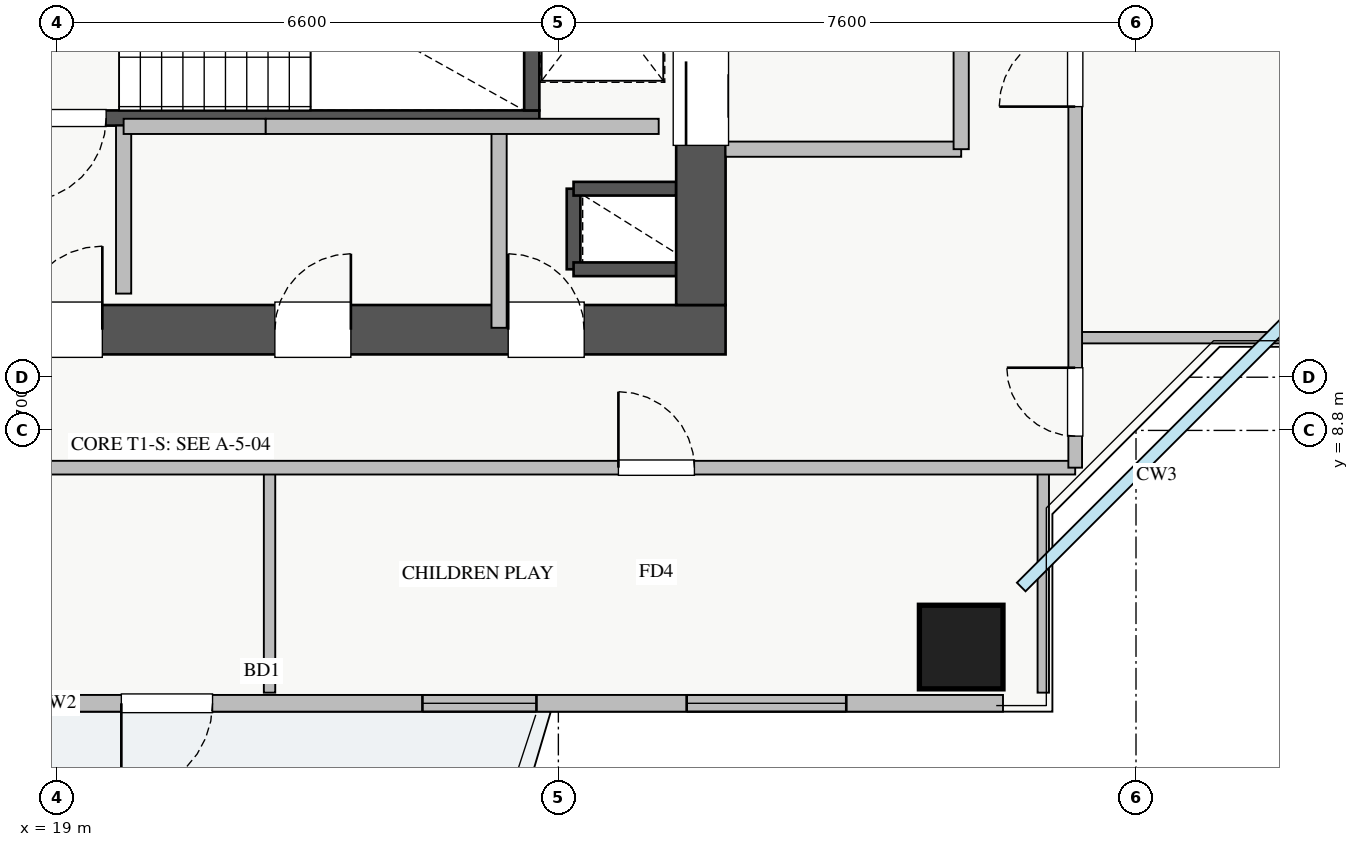
"""IFC4 building model, lengths in metres.
Left out: names, types, materials, properties, quantities, classifications, styles, units other than length and angle.
Written with IfcOpenShell. Run it as: python <this file> out.ifc"""

import sys

from ifc_helpers import new_model, si_unit, direction, frame, frame_2d, origin, origin_2d, place, context, subcontext, project, spatial, rectangle, extrude, source, transform, mapped, element, fill, save


model = new_model("IFC4")
c1 = context("Model", 3, precision=1e-05, world=origin(), true_north=direction((0.0, 1.0)))
c2 = subcontext(c1, "Body", "Model", "MODEL_VIEW")
j1 = project(units=[si_unit("LENGTHUNIT", "METRE"), si_unit("PLANEANGLEUNIT", "RADIAN")], contexts=[c1])
p1 = place(None, origin())
s1 = spatial("IfcSite", under=j1, at=p1, CompositionType="ELEMENT")
p2 = place(p1, origin())
s2 = spatial("IfcBuilding", under=s1, at=p2, CompositionType="ELEMENT")
p3 = place(p2, frame((0.0, 0.0, 136.0)))
s3 = spatial("IfcBuildingStorey", under=s2, at=p3, CompositionType="ELEMENT", Elevation=136.0)
p4 = place(p3, frame((25.8, 10.92, 0.0), z_axis=(0.0, 0.0, 1.0), x_axis=(0.0, 1.0, 0.0)))
e1 = element("IfcWall", 1, at=p4, inside=s3, PredefinedType="SHEAR", context=c2, shape_type="SweptSolid", body=[
    extrude(rectangle(XDim=1.06, YDim=0.18, at=frame_2d((0.53, 0.0))), origin(), (0.0, 0.0, 1.0), 3.03),
])
for number, where, z_axis, x_axis in (
    (2, (25.8, 11.98, 0.0), (0.0, 0.0, 1.0), (1.0, 0.0, 0.0)),
    (3, (25.8, 10.92, 0.0), (0.0, 0.0, 1.0), (1.0, 0.0, 0.0)),
):
    element("IfcWall", number, at=place(p3, frame(where, z_axis=z_axis, x_axis=x_axis)), inside=s3, PredefinedType="SHEAR", context=c2, shape_type="SweptSolid", body=[
        extrude(rectangle(XDim=1.35, YDim=0.18, at=frame_2d((0.675, 0.0))), origin(), (0.0, 0.0, 1.0), 3.03),
    ])
p5 = place(p3, frame((18.2, 12.91, 0.0), z_axis=(0.0, 0.0, 1.0), x_axis=(1.0, 0.0, 0.0)))
e4 = element("IfcWall", 4, at=p5, inside=s3, PredefinedType="SHEAR", context=c2, shape_type="SweptSolid", body=[
    extrude(rectangle(XDim=7.15, YDim=0.2, at=frame_2d((3.575, 0.0))), origin(), (0.0, 0.0, 1.0), 3.25),
])
p6 = place(p5, frame((0.35, 0.0, 0.0)))
e5 = element("IfcOpeningElement", 5, at=p6, cuts=e4, PredefinedType="OPENING", context=c2, shape_type="SweptSolid", body=[
    extrude(rectangle(XDim=1.1, YDim=2.05, at=frame_2d((0.55, 1.025))), frame((0.0, 0.11, 0.0), z_axis=(0.0, -1.0, 0.0), x_axis=(1.0, 0.0, 0.0)), (0.0, 0.0, 1.0), 0.22),
])
p7 = place(p3, frame((25.25, 13.01, 0.0), z_axis=(0.0, 0.0, 1.0), x_axis=(0.0, 1.0, 0.0)))
e6 = element("IfcWall", 6, at=p7, inside=s3, PredefinedType="SHEAR", context=c2, shape_type="SweptSolid", body=[
    extrude(rectangle(XDim=2.94, YDim=0.2, at=frame_2d((1.47, 0.0))), origin(), (0.0, 0.0, 1.0), 3.25),
])
p8 = place(p3, frame((10.2, 10.125, 0.0), z_axis=(0.0, 0.0, 1.0), x_axis=(1.0, 0.0, 0.0)))
e7 = element("IfcWall", 7, at=p8, inside=s3, PredefinedType="SHEAR", context=c2, shape_type="SweptSolid", body=[
    extrude(rectangle(XDim=17.6, YDim=0.65, at=frame_2d((8.8, 0.0))), origin(), (0.0, 0.0, 1.0), 3.25),
])
p9 = place(p8, frame((1.15, 0.0, 0.0)))
e8 = element("IfcOpeningElement", 8, at=p9, cuts=e7, PredefinedType="OPENING", context=c2, shape_type="SweptSolid", body=[
    extrude(rectangle(XDim=1.1, YDim=2.05, at=frame_2d((0.55, 1.025))), frame((0.0, 0.335, 0.0), z_axis=(0.0, -1.0, 0.0), x_axis=(1.0, 0.0, 0.0)), (0.0, 0.0, 1.0), 0.67),
])
p10 = place(p8, frame((8.3, 0.0, 0.0)))
e9 = element("IfcOpeningElement", 9, at=p10, cuts=e7, PredefinedType="OPENING", context=c2, shape_type="SweptSolid", body=[
    extrude(rectangle(XDim=1.1, YDim=2.05, at=frame_2d((0.55, 1.025))), frame((0.0, 0.335, 0.0), z_axis=(0.0, -1.0, 0.0), x_axis=(1.0, 0.0, 0.0)), (0.0, 0.0, 1.0), 0.67),
])
p11 = place(p8, frame((4.9, 0.0, 0.0)))
e10 = element("IfcOpeningElement", 10, at=p11, cuts=e7, PredefinedType="OPENING", context=c2, shape_type="SweptSolid", body=[
    extrude(rectangle(XDim=1.1, YDim=2.05, at=frame_2d((0.55, 1.025))), frame((0.0, 0.335, 0.0), z_axis=(0.0, -1.0, 0.0), x_axis=(1.0, 0.0, 0.0)), (0.0, 0.0, 1.0), 0.67),
])
p12 = place(p8, frame((14.74, 0.0, 0.0)))
e11 = element("IfcOpeningElement", 11, at=p12, cuts=e7, PredefinedType="OPENING", context=c2, shape_type="SweptSolid", body=[
    extrude(rectangle(XDim=1.0, YDim=2.05, at=frame_2d((0.5, 1.025))), frame((0.0, 0.335, 0.0), z_axis=(0.0, -1.0, 0.0), x_axis=(1.0, 0.0, 0.0)), (0.0, 0.0, 1.0), 0.67),
])
p13 = place(p8, frame((11.67, 0.0, 0.0)))
e12 = element("IfcOpeningElement", 12, at=p13, cuts=e7, PredefinedType="OPENING", context=c2, shape_type="SweptSolid", body=[
    extrude(rectangle(XDim=1.0, YDim=2.05, at=frame_2d((0.5, 1.025))), frame((0.0, 0.335, 0.0), z_axis=(0.0, -1.0, 0.0), x_axis=(1.0, 0.0, 0.0)), (0.0, 0.0, 1.0), 0.67),
])
p14 = place(p3, frame((27.475, 10.45, 0.0), z_axis=(0.0, 0.0, 1.0), x_axis=(0.0, 1.0, 0.0)))
e13 = element("IfcWall", 13, at=p14, inside=s3, PredefinedType="SHEAR", context=c2, shape_type="SweptSolid", body=[
    extrude(rectangle(XDim=5.9, YDim=0.65, at=frame_2d((2.95, 0.0))), origin(), (0.0, 0.0, 1.0), 3.25),
])
p15 = place(p14, frame((2.1, 0.0, 0.0)))
e14 = element("IfcOpeningElement", 14, at=p15, cuts=e13, PredefinedType="OPENING", context=c2, shape_type="SweptSolid", body=[
    extrude(rectangle(XDim=1.3, YDim=2.05, at=frame_2d((0.65, 1.025))), frame((0.0, 0.335, 0.0), z_axis=(0.0, -1.0, 0.0), x_axis=(1.0, 0.0, 0.0)), (0.0, 0.0, 1.0), 0.67),
])
m1 = source(origin(), c2, "Body", "SweptSolid", [
    extrude(rectangle(XDim=1.1, YDim=1.1, at=origin_2d()), origin(), (0.0, 0.0, 1.0), 3.25),
])
p16 = place(p3, frame((30.9, 5.95, 0.0), z_axis=(0.0, 0.0, 1.0), x_axis=(1.0, 0.0, 0.0)))
e15 = element("IfcColumn", 15, at=p16, inside=s3, PredefinedType="COLUMN", context=c2, shape_type="MappedRepresentation", body=[
    mapped(m1, transform((0.0, 0.0, 0.0), x_axis=(1.0, 0.0, 0.0), y_axis=(0.0, 1.0, 0.0), z_axis=(0.0, 0.0, 1.0), scale=1.0)),
])
p17 = place(p3, frame((6.55, 5.21, 0.0), z_axis=(0.0, 0.0, 1.0), x_axis=(1.0, 0.0, 0.0)))
e16 = element("IfcWall", 16, at=p17, inside=s3, PredefinedType="STANDARD", context=c2, shape_type="SweptSolid", body=[
    extrude(rectangle(XDim=24.9, YDim=0.22, at=frame_2d((12.45, 0.0))), origin(), (0.0, 0.0, 1.0), 2.57),
])
p18 = place(p17, frame((13.3, 0.0, 0.0)))
e17 = element("IfcOpeningElement", 17, at=p18, cuts=e16, PredefinedType="OPENING", context=c2, shape_type="SweptSolid", body=[
    extrude(rectangle(XDim=1.2, YDim=2.1, at=frame_2d((0.6, 1.05))), frame((0.0, 0.12, 0.0), z_axis=(0.0, -1.0, 0.0), x_axis=(1.0, 0.0, 0.0)), (0.0, 0.0, 1.0), 0.24),
])
p19 = place(p17, frame((0.393, 0.0, 0.9)))
e18 = element("IfcOpeningElement", 18, at=p19, cuts=e16, PredefinedType="OPENING", context=c2, shape_type="SweptSolid", body=[
    extrude(rectangle(XDim=1.5, YDim=1.5, at=frame_2d((0.75, 0.75))), frame((0.0, 0.12, 0.0), z_axis=(0.0, -1.0, 0.0), x_axis=(1.0, 0.0, 0.0)), (0.0, 0.0, 1.0), 0.24),
])
p20 = place(p17, frame((8.438, 0.0, 0.9)))
e19 = element("IfcOpeningElement", 19, at=p20, cuts=e16, PredefinedType="OPENING", context=c2, shape_type="SweptSolid", body=[
    extrude(rectangle(XDim=1.8, YDim=1.45, at=frame_2d((0.9, 0.725))), frame((0.0, 0.12, 0.0), z_axis=(0.0, -1.0, 0.0), x_axis=(1.0, 0.0, 0.0)), (0.0, 0.0, 1.0), 0.24),
])
p21 = place(p17, frame((17.261, 0.0, 0.9)))
e20 = element("IfcOpeningElement", 20, at=p21, cuts=e16, PredefinedType="OPENING", context=c2, shape_type="SweptSolid", body=[
    extrude(rectangle(XDim=1.5, YDim=1.5, at=frame_2d((0.75, 0.75))), frame((0.0, 0.12, 0.0), z_axis=(0.0, -1.0, 0.0), x_axis=(1.0, 0.0, 0.0)), (0.0, 0.0, 1.0), 0.24),
])
p22 = place(p17, frame((20.738, 0.0, 0.9)))
e21 = element("IfcOpeningElement", 21, at=p22, cuts=e16, PredefinedType="OPENING", context=c2, shape_type="SweptSolid", body=[
    extrude(rectangle(XDim=2.1, YDim=1.48, at=frame_2d((1.05, 0.74))), frame((0.0, 0.12, 0.0), z_axis=(0.0, -1.0, 0.0), x_axis=(1.0, 0.0, 0.0)), (0.0, 0.0, 1.0), 0.24),
])
p23 = place(p17, frame((4.171, 0.0, 0.9)))
e22 = element("IfcOpeningElement", 22, at=p23, cuts=e16, PredefinedType="OPENING", context=c2, shape_type="SweptSolid", body=[
    extrude(rectangle(XDim=2.4, YDim=1.5, at=frame_2d((1.2, 0.75))), frame((0.0, 0.12, 0.0), z_axis=(0.0, -1.0, 0.0), x_axis=(1.0, 0.0, 0.0)), (0.0, 0.0, 1.0), 0.24),
])
p24 = place(p3, frame((27.8, 12.5, 0.0), z_axis=(0.0, 0.0, 1.0), x_axis=(1.0, 0.0, 0.0)))
e23 = element("IfcWall", 23, at=p24, inside=s3, PredefinedType="PARTITIONING", context=c2, shape_type="SweptSolid", body=[
    extrude(rectangle(XDim=3.1, YDim=0.2, at=frame_2d((1.55, 0.0))), origin(), (0.0, 0.0, 1.0), 3.03),
])
p25 = place(p3, frame((30.9, 12.5, 0.0), z_axis=(0.0, 0.0, 1.0), x_axis=(0.0, 1.0, 0.0)))
e24 = element("IfcWall", 24, at=p25, inside=s3, PredefinedType="PARTITIONING", context=c2, shape_type="SweptSolid", body=[
    extrude(rectangle(XDim=3.9, YDim=0.2, at=frame_2d((1.95, 0.0))), origin(), (0.0, 0.0, 1.0), 3.03),
])
p26 = place(p25, frame((1.4, 0.0, 0.0)))
e25 = element("IfcOpeningElement", 25, at=p26, cuts=e24, PredefinedType="OPENING", context=c2, shape_type="SweptSolid", body=[
    extrude(rectangle(XDim=1.1, YDim=2.05, at=frame_2d((0.55, 1.025))), frame((0.0, 0.11, 0.0), z_axis=(0.0, -1.0, 0.0), x_axis=(1.0, 0.0, 0.0)), (0.0, 0.0, 1.0), 0.22),
])
p27 = place(p3, frame((19.88, 10.6, 0.0), z_axis=(0.0, 0.0, 1.0), x_axis=(0.0, 1.0, 0.0)))
e26 = element("IfcWall", 26, at=p27, inside=s3, PredefinedType="PARTITIONING", context=c2, shape_type="SweptSolid", body=[
    extrude(rectangle(XDim=2.21, YDim=0.2, at=frame_2d((1.105, 0.0))), origin(), (0.0, 0.0, 1.0), 3.03),
])
p28 = place(p3, frame((24.82, 10.15, 0.0), z_axis=(0.0, 0.0, 1.0), x_axis=(0.0, 1.0, 0.0)))
e27 = element("IfcWall", 27, at=p28, inside=s3, PredefinedType="PARTITIONING", context=c2, shape_type="SweptSolid", body=[
    extrude(rectangle(XDim=2.65, YDim=0.2, at=frame_2d((1.325, 0.0))), origin(), (0.0, 0.0, 1.0), 3.03),
])
p29 = place(p3, frame((19.88, 12.8, 0.0), z_axis=(0.0, 0.0, 1.0), x_axis=(1.0, 0.0, 0.0)))
e28 = element("IfcWall", 28, at=p29, inside=s3, PredefinedType="PARTITIONING", context=c2, shape_type="SweptSolid", body=[
    extrude(rectangle(XDim=1.87, YDim=0.2, at=frame_2d((0.935, 0.0))), origin(), (0.0, 0.0, 1.0), 3.03),
])
p30 = place(p3, frame((21.75, 12.8, 0.0), z_axis=(0.0, 0.0, 1.0), x_axis=(1.0, 0.0, 0.0)))
e29 = element("IfcWall", 29, at=p30, inside=s3, PredefinedType="PARTITIONING", context=c2, shape_type="SweptSolid", body=[
    extrude(rectangle(XDim=5.17, YDim=0.2, at=frame_2d((2.585, 0.0))), origin(), (0.0, 0.0, 1.0), 3.03),
])
for number, where, z_axis, x_axis in (
    (30, (21.8, 5.35, 0.0), (0.0, 0.0, 1.0), (0.0, 1.0, 0.0)),
    (31, (31.98, 5.35, 0.0), (0.0, 0.0, 1.0), (0.0, 1.0, 0.0)),
):
    element("IfcWall", number, at=place(p3, frame(where, z_axis=z_axis, x_axis=x_axis)), inside=s3, PredefinedType="PARTITIONING", context=c2, shape_type="SweptSolid", body=[
        extrude(rectangle(XDim=2.96, YDim=0.15, at=frame_2d((1.48, 0.0))), origin(), (0.0, 0.0, 1.0), 3.03),
    ])
p31 = place(p3, frame((8.82, 8.31, 0.0), z_axis=(0.0, 0.0, 1.0), x_axis=(1.0, 0.0, 0.0)))
e32 = element("IfcWall", 32, at=p31, inside=s3, PredefinedType="PARTITIONING", context=c2, shape_type="SweptSolid", body=[
    extrude(rectangle(XDim=23.58, YDim=0.18, at=frame_2d((11.79, 0.0))), origin(), (0.0, 0.0, 1.0), 3.03),
])
p32 = place(p31, frame((5.99, 0.0, 0.0)))
e33 = element("IfcOpeningElement", 33, at=p32, cuts=e32, PredefinedType="OPENING", context=c2, shape_type="SweptSolid", body=[
    extrude(rectangle(XDim=1.0, YDim=2.05, at=frame_2d((0.5, 1.025))), frame((0.0, 0.1, 0.0), z_axis=(0.0, -1.0, 0.0), x_axis=(1.0, 0.0, 0.0)), (0.0, 0.0, 1.0), 0.2),
])
p33 = place(p31, frame((17.57, 0.0, 0.0)))
e34 = element("IfcOpeningElement", 34, at=p33, cuts=e32, PredefinedType="OPENING", context=c2, shape_type="SweptSolid", body=[
    extrude(rectangle(XDim=1.0, YDim=2.05, at=frame_2d((0.5, 1.025))), frame((0.0, 0.1, 0.0), z_axis=(0.0, -1.0, 0.0), x_axis=(1.0, 0.0, 0.0)), (0.0, 0.0, 1.0), 0.2),
])
p34 = place(p3, frame((32.4, 10.02, 0.0), z_axis=(0.0, 0.0, 1.0), x_axis=(1.0, 0.0, 0.0)))
e35 = element("IfcWall", 35, at=p34, inside=s3, PredefinedType="PARTITIONING", context=c2, shape_type="SweptSolid", body=[
    extrude(rectangle(XDim=4.25, YDim=0.15, at=frame_2d((2.125, 0.0))), origin(), (0.0, 0.0, 1.0), 3.03),
])
p35 = place(p3, frame((32.4, 8.31, 0.0), z_axis=(0.0, 0.0, 1.0), x_axis=(0.0, 1.0, 0.0)))
e36 = element("IfcWall", 36, at=p35, inside=s3, PredefinedType="PARTITIONING", context=c2, shape_type="SweptSolid", body=[
    extrude(rectangle(XDim=29.13, YDim=0.18, at=frame_2d((14.565, 0.0))), origin(), (0.0, 0.0, 1.0), 3.03),
])
p36 = place(p35, frame((27.94, 0.0, 0.0)))
e37 = element("IfcOpeningElement", 37, at=p36, cuts=e36, PredefinedType="OPENING", context=c2, shape_type="SweptSolid", body=[
    extrude(rectangle(XDim=0.9, YDim=2.05, at=frame_2d((0.45, 1.025))), frame((0.0, 0.1, 0.0), z_axis=(0.0, -1.0, 0.0), x_axis=(1.0, 0.0, 0.0)), (0.0, 0.0, 1.0), 0.2),
])
p37 = place(p35, frame((0.415, 0.0, 0.0)))
e38 = element("IfcOpeningElement", 38, at=p37, cuts=e36, PredefinedType="OPENING", context=c2, shape_type="SweptSolid", body=[
    extrude(rectangle(XDim=0.9, YDim=2.05, at=frame_2d((0.45, 1.025))), frame((0.0, 0.1, 0.0), z_axis=(0.0, -1.0, 0.0), x_axis=(1.0, 0.0, 0.0)), (0.0, 0.0, 1.0), 0.2),
])
p38 = place(p35, frame((4.75, 0.0, 0.0)))
e39 = element("IfcOpeningElement", 39, at=p38, cuts=e36, PredefinedType="OPENING", context=c2, shape_type="SweptSolid", body=[
    extrude(rectangle(XDim=1.0, YDim=2.05, at=frame_2d((0.5, 1.025))), frame((0.0, 0.1, 0.0), z_axis=(0.0, -1.0, 0.0), x_axis=(1.0, 0.0, 0.0)), (0.0, 0.0, 1.0), 0.2),
])
p39 = place(p35, frame((18.11, 0.0, 0.0)))
e40 = element("IfcOpeningElement", 40, at=p39, cuts=e36, PredefinedType="OPENING", context=c2, shape_type="SweptSolid", body=[
    extrude(rectangle(XDim=1.0, YDim=2.05, at=frame_2d((0.5, 1.025))), frame((0.0, 0.1, 0.0), z_axis=(0.0, -1.0, 0.0), x_axis=(1.0, 0.0, 0.0)), (0.0, 0.0, 1.0), 0.2),
])
m2 = source(origin(), c2, "Body", "SweptSolid", [
    extrude(rectangle(XDim=1.2, YDim=2.1, at=frame_2d((0.6, 1.05))), frame((0.0, 0.025, 0.0), z_axis=(0.0, -1.0, 0.0), x_axis=(1.0, 0.0, 0.0)), (0.0, 0.0, 1.0), 0.05),
])
p40 = place(p18, frame((1.2, 0.0, 0.0), z_axis=(0.0, 0.0, 1.0), x_axis=(-1.0, 0.0, 0.0)))
e41 = element("IfcDoor", 41, at=p40, inside=s3, OperationType="SINGLE_SWING_LEFT", PredefinedType="DOOR", context=c2, shape_type="MappedRepresentation", body=[
    mapped(m2, transform((0.0, 0.0, 0.0), x_axis=(1.0, 0.0, 0.0), y_axis=(0.0, 1.0, 0.0), z_axis=(0.0, 0.0, 1.0), scale=1.0)),
])
fill(e17, e41)
m3 = source(origin(), c2, "Body", "SweptSolid", [
    extrude(rectangle(XDim=1.5, YDim=1.5, at=frame_2d((0.75, 0.75))), frame((0.0, 0.03, 0.0), z_axis=(0.0, -1.0, 0.0), x_axis=(1.0, 0.0, 0.0)), (0.0, 0.0, 1.0), 0.06),
])
p41 = place(p21, origin())
e42 = element("IfcWindow", 42, at=p41, inside=s3, PartitioningType="DOUBLE_PANEL_VERTICAL", PredefinedType="WINDOW", context=c2, shape_type="MappedRepresentation", body=[
    mapped(m3, transform((0.0, 0.0, 0.0), x_axis=(1.0, 0.0, 0.0), y_axis=(0.0, 1.0, 0.0), z_axis=(0.0, 0.0, 1.0), scale=1.0)),
])
fill(e20, e42)
m4 = source(origin(), c2, "Body", "SweptSolid", [
    extrude(rectangle(XDim=2.1, YDim=1.48, at=frame_2d((1.05, 0.74))), frame((0.0, 0.03, 0.0), z_axis=(0.0, -1.0, 0.0), x_axis=(1.0, 0.0, 0.0)), (0.0, 0.0, 1.0), 0.06),
])
p42 = place(p22, origin())
e43 = element("IfcWindow", 43, at=p42, inside=s3, PartitioningType="TRIPLE_PANEL_VERTICAL", PredefinedType="WINDOW", context=c2, shape_type="MappedRepresentation", body=[
    mapped(m4, transform((0.0, 0.0, 0.0), x_axis=(1.0, 0.0, 0.0), y_axis=(0.0, 1.0, 0.0), z_axis=(0.0, 0.0, 1.0), scale=1.0)),
])
fill(e21, e43)
m5 = source(origin(), c2, "Body", "SweptSolid", [
    extrude(rectangle(XDim=1.3, YDim=2.05, at=frame_2d((0.65, 1.025))), frame((0.0, 0.025, 0.0), z_axis=(0.0, -1.0, 0.0), x_axis=(1.0, 0.0, 0.0)), (0.0, 0.0, 1.0), 0.05),
])
p43 = place(p15, origin())
e44 = element("IfcDoor", 44, at=p43, inside=s3, OperationType="SLIDING_TO_RIGHT", PredefinedType="DOOR", context=c2, shape_type="MappedRepresentation", body=[
    mapped(m5, transform((0.0, 0.0, 0.0), x_axis=(1.0, 0.0, 0.0), y_axis=(0.0, 1.0, 0.0), z_axis=(0.0, 0.0, 1.0), scale=1.0)),
])
fill(e14, e44)
m6 = source(origin(), c2, "Body", "SweptSolid", [
    extrude(rectangle(XDim=1.1, YDim=2.05, at=frame_2d((0.55, 1.025))), frame((0.0, 0.025, 0.0), z_axis=(0.0, -1.0, 0.0), x_axis=(1.0, 0.0, 0.0)), (0.0, 0.0, 1.0), 0.05),
])
p44 = place(p10, origin())
e45 = element("IfcDoor", 45, at=p44, inside=s3, OperationType="SINGLE_SWING_RIGHT", PredefinedType="DOOR", context=c2, shape_type="MappedRepresentation", body=[
    mapped(m6, transform((0.0, 0.0, 0.0), x_axis=(1.0, 0.0, 0.0), y_axis=(0.0, 1.0, 0.0), z_axis=(0.0, 0.0, 1.0), scale=1.0)),
])
fill(e9, e45)
p45 = place(p6, frame((1.1, 0.0, 0.0), z_axis=(0.0, 0.0, 1.0), x_axis=(-1.0, 0.0, 0.0)))
e46 = element("IfcDoor", 46, at=p45, inside=s3, OperationType="SINGLE_SWING_LEFT", PredefinedType="DOOR", context=c2, shape_type="MappedRepresentation", body=[
    mapped(m6, transform((0.0, 0.0, 0.0), x_axis=(1.0, 0.0, 0.0), y_axis=(0.0, 1.0, 0.0), z_axis=(0.0, 0.0, 1.0), scale=1.0)),
])
fill(e5, e46)
m7 = source(origin(), c2, "Body", "SweptSolid", [
    extrude(rectangle(XDim=1.0, YDim=2.05, at=frame_2d((0.5, 1.025))), frame((0.0, 0.025, 0.0), z_axis=(0.0, -1.0, 0.0), x_axis=(1.0, 0.0, 0.0)), (0.0, 0.0, 1.0), 0.05),
])
p46 = place(p12, origin())
e47 = element("IfcDoor", 47, at=p46, inside=s3, OperationType="SINGLE_SWING_LEFT", PredefinedType="DOOR", context=c2, shape_type="MappedRepresentation", body=[
    mapped(m7, transform((0.0, 0.0, 0.0), x_axis=(1.0, 0.0, 0.0), y_axis=(0.0, 1.0, 0.0), z_axis=(0.0, 0.0, 1.0), scale=1.0)),
])
fill(e11, e47)
p47 = place(p13, origin())
e48 = element("IfcDoor", 48, at=p47, inside=s3, OperationType="SINGLE_SWING_RIGHT", PredefinedType="DOOR", context=c2, shape_type="MappedRepresentation", body=[
    mapped(m7, transform((0.0, 0.0, 0.0), x_axis=(1.0, 0.0, 0.0), y_axis=(0.0, 1.0, 0.0), z_axis=(0.0, 0.0, 1.0), scale=1.0)),
])
fill(e12, e48)
p48 = place(p33, origin())
e49 = element("IfcDoor", 49, at=p48, inside=s3, OperationType="SINGLE_SWING_LEFT", PredefinedType="DOOR", context=c2, shape_type="MappedRepresentation", body=[
    mapped(m7, transform((0.0, 0.0, 0.0), x_axis=(1.0, 0.0, 0.0), y_axis=(0.0, 1.0, 0.0), z_axis=(0.0, 0.0, 1.0), scale=1.0)),
])
fill(e34, e49)
m8 = source(origin(), c2, "Body", "SweptSolid", [
    extrude(rectangle(XDim=0.9, YDim=2.05, at=frame_2d((0.45, 1.025))), frame((0.0, 0.025, 0.0), z_axis=(0.0, -1.0, 0.0), x_axis=(1.0, 0.0, 0.0)), (0.0, 0.0, 1.0), 0.05),
])
p49 = place(p37, origin())
e50 = element("IfcDoor", 50, at=p49, inside=s3, OperationType="SINGLE_SWING_RIGHT", PredefinedType="DOOR", context=c2, shape_type="MappedRepresentation", body=[
    mapped(m8, transform((0.0, 0.0, 0.0), x_axis=(1.0, 0.0, 0.0), y_axis=(0.0, 1.0, 0.0), z_axis=(0.0, 0.0, 1.0), scale=1.0)),
])
fill(e38, e50)
p50 = place(p38, origin())
e51 = element("IfcDoor", 51, at=p50, inside=s3, OperationType="SINGLE_SWING_LEFT", PredefinedType="DOOR", context=c2, shape_type="MappedRepresentation", body=[
    mapped(m7, transform((0.0, 0.0, 0.0), x_axis=(1.0, 0.0, 0.0), y_axis=(0.0, 1.0, 0.0), z_axis=(0.0, 0.0, 1.0), scale=1.0)),
])
fill(e39, e51)
save(model, sys.argv[1])
